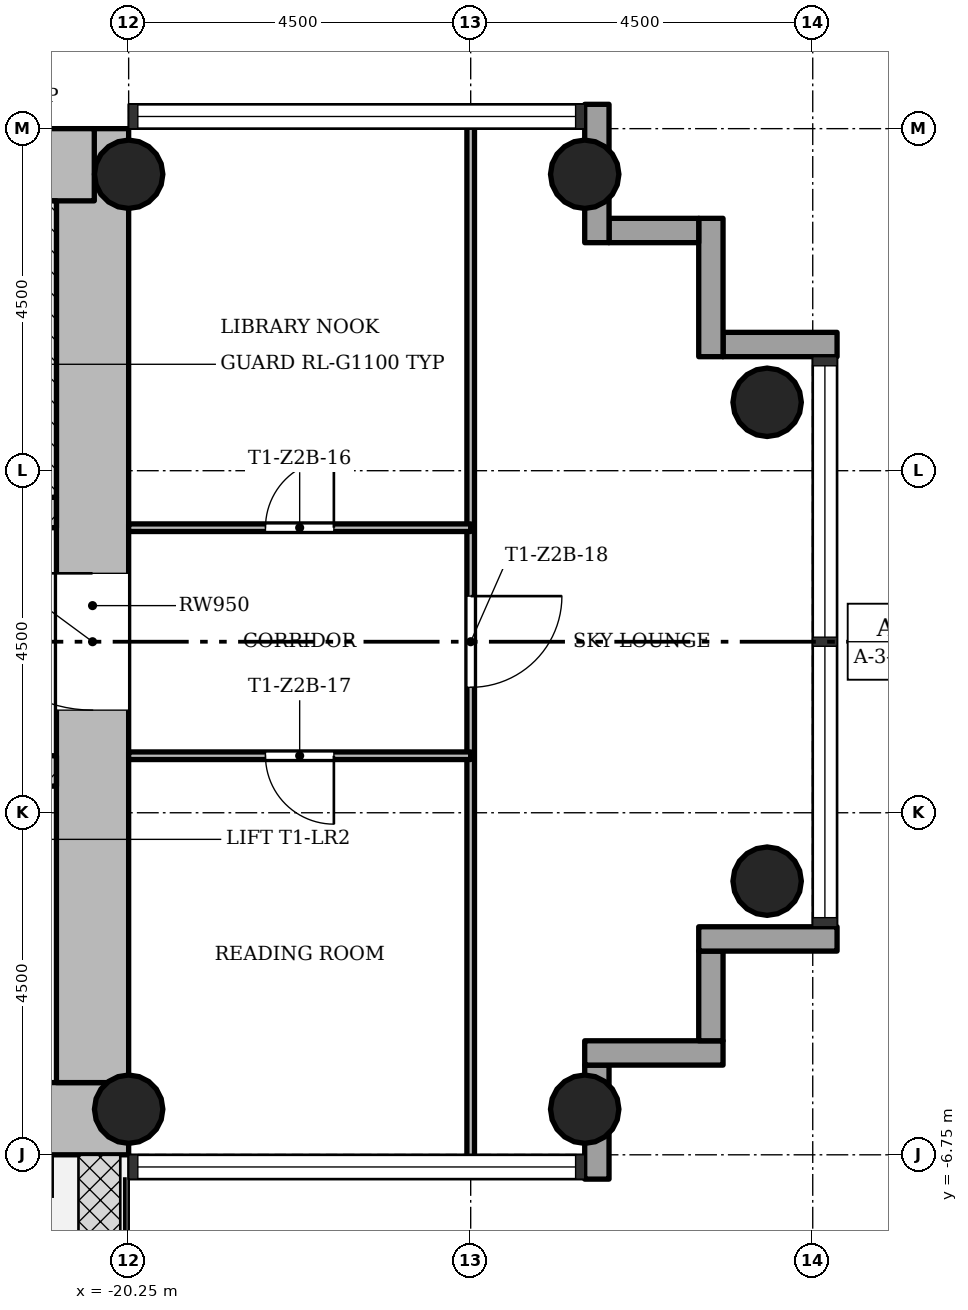
"""IFC4 building model, lengths in metres.
Left out: names, types, materials, properties, quantities, classifications, styles, units other than length and angle.
Written with IfcOpenShell. Run it as: python <this file> out.ifc"""

import sys

from ifc_helpers import new_model, si_unit, direction, frame, frame_2d, origin, origin_2d, place, context, subcontext, project, spatial, rectangle, hollow_circle, extrude, element, fill, save


model = new_model("IFC4")
c1 = context("Model", 3, precision=1e-05, world=origin(), true_north=direction((0.0, 1.0)))
c2 = subcontext(c1, "Body", "Model", "MODEL_VIEW")
j1 = project(units=[si_unit("LENGTHUNIT", "METRE"), si_unit("PLANEANGLEUNIT", "RADIAN")], contexts=[c1])
p1 = place(None, origin())
s1 = spatial("IfcSite", under=j1, at=p1, CompositionType="ELEMENT")
p2 = place(p1, origin())
s2 = spatial("IfcBuilding", under=s1, at=p2, CompositionType="ELEMENT")
p3 = place(p2, frame((0.0, 0.0, 76.6)))
s3 = spatial("IfcBuildingStorey", under=s2, at=p3, CompositionType="ELEMENT", Elevation=76.6)
p4 = place(p3, frame((-28.3, -6.275, 0.0), z_axis=(0.0, 0.0, 1.0), x_axis=(1.0, 0.0, 0.0)))
e1 = element("IfcWall", 1, at=p4, inside=s3, PredefinedType="SHEAR", context=c2, shape_type="SweptSolid", body=[
    extrude(rectangle(XDim=8.05, YDim=0.95, at=frame_2d((4.025, 0.0))), origin(), (0.0, 0.0, 1.0), 3.4),
])
p5 = place(p3, frame((-20.725, -5.8, 0.0), z_axis=(0.0, 0.0, 1.0), x_axis=(0.0, 1.0, 0.0)))
e2 = element("IfcWall", 2, at=p5, inside=s3, PredefinedType="SHEAR", context=c2, shape_type="SweptSolid", body=[
    extrude(rectangle(XDim=12.55, YDim=0.95, at=frame_2d((6.275, 0.0))), origin(), (0.0, 0.0, 1.0), 3.4),
])
p6 = place(p5, frame((4.9, 0.0, 0.0)))
e3 = element("IfcOpeningElement", 3, at=p6, cuts=e2, PredefinedType="OPENING", context=c2, shape_type="SweptSolid", body=[
    extrude(rectangle(XDim=1.8, YDim=2.1, at=frame_2d((0.9, 1.05))), frame((0.0, 0.485, 0.0), z_axis=(0.0, -1.0, 0.0), x_axis=(1.0, 0.0, 0.0)), (0.0, 0.0, 1.0), 0.97),
])
p7 = place(p3, frame((-20.702, 6.275, 0.0), z_axis=(0.0, 0.0, 1.0), x_axis=(-1.0, 0.0, 0.0)))
e4 = element("IfcWall", 4, at=p7, inside=s3, PredefinedType="SHEAR", context=c2, shape_type="SweptSolid", body=[
    extrude(rectangle(XDim=8.696, YDim=0.95, at=frame_2d((4.348, 0.0))), origin(), (0.0, 0.0, 1.0), 3.4),
])
p8 = place(p3, frame((-28.3, -1.7, 0.0), z_axis=(0.0, 0.0, 1.0), x_axis=(1.0, 0.0, 0.0)))
e5 = element("IfcWall", 5, at=p8, inside=s3, PredefinedType="SHEAR", context=c2, shape_type="SweptSolid", body=[
    extrude(rectangle(XDim=7.1, YDim=0.4, at=frame_2d((3.55, 0.0))), origin(), (0.0, 0.0, 1.0), 3.4),
])
p9 = place(p8, frame((0.8, 0.0, 0.0)))
e6 = element("IfcOpeningElement", 6, at=p9, cuts=e5, PredefinedType="OPENING", context=c2, shape_type="SweptSolid", body=[
    extrude(rectangle(XDim=1.1, YDim=2.1, at=frame_2d((0.55, 1.05))), frame((0.0, 0.21, 0.0), z_axis=(0.0, -1.0, 0.0), x_axis=(1.0, 0.0, 0.0)), (0.0, 0.0, 1.0), 0.42),
])
p10 = place(p8, frame((3.0, 0.0, 0.0)))
e7 = element("IfcOpeningElement", 7, at=p10, cuts=e5, PredefinedType="OPENING", context=c2, shape_type="SweptSolid", body=[
    extrude(rectangle(XDim=1.1, YDim=2.1, at=frame_2d((0.55, 1.05))), frame((0.0, 0.21, 0.0), z_axis=(0.0, -1.0, 0.0), x_axis=(1.0, 0.0, 0.0)), (0.0, 0.0, 1.0), 0.42),
])
p11 = place(p8, frame((5.2, 0.0, 0.0)))
e8 = element("IfcOpeningElement", 8, at=p11, cuts=e5, PredefinedType="OPENING", context=c2, shape_type="SweptSolid", body=[
    extrude(rectangle(XDim=1.1, YDim=2.1, at=frame_2d((0.55, 1.05))), frame((0.0, 0.21, 0.0), z_axis=(0.0, -1.0, 0.0), x_axis=(1.0, 0.0, 0.0)), (0.0, 0.0, 1.0), 0.42),
])
p12 = place(p3, frame((-28.3, 1.7, 0.0), z_axis=(0.0, 0.0, 1.0), x_axis=(1.0, 0.0, 0.0)))
e9 = element("IfcWall", 9, at=p12, inside=s3, PredefinedType="SHEAR", context=c2, shape_type="SweptSolid", body=[
    extrude(rectangle(XDim=7.1, YDim=0.4, at=frame_2d((3.55, 0.0))), origin(), (0.0, 0.0, 1.0), 3.4),
])
p13 = place(p12, frame((0.7, 0.0, 0.0)))
e10 = element("IfcOpeningElement", 10, at=p13, cuts=e9, PredefinedType="OPENING", context=c2, shape_type="SweptSolid", body=[
    extrude(rectangle(XDim=0.9, YDim=2.1, at=frame_2d((0.45, 1.05))), frame((0.0, 0.21, 0.0), z_axis=(0.0, -1.0, 0.0), x_axis=(1.0, 0.0, 0.0)), (0.0, 0.0, 1.0), 0.42),
])
for number, where, z_axis, x_axis in (
    (11, (-20.25, -6.15, 0.0), (0.0, 0.0, 1.0), (1.0, 0.0, 0.0)),
    (12, (-20.25, 6.15, 0.0), (0.0, 0.0, 1.0), (1.0, 0.0, 0.0)),
    (13, (-14.25, -6.15, 0.0), (0.0, 0.0, 1.0), (1.0, 0.0, 0.0)),
    (14, (-14.25, 6.15, 0.0), (0.0, 0.0, 1.0), (1.0, 0.0, 0.0)),
    (15, (-11.85, -3.15, 0.0), (0.0, 0.0, 1.0), (1.0, 0.0, 0.0)),
    (16, (-11.85, 3.15, 0.0), (0.0, 0.0, 1.0), (1.0, 0.0, 0.0)),
):
    element("IfcColumn", number, at=place(p3, frame(where, z_axis=z_axis, x_axis=x_axis)), inside=s3, PredefinedType="COLUMN", context=c2, shape_type="SweptSolid", body=[
        extrude(hollow_circle(Radius=0.45, WallThickness=0.032, at=origin_2d()), origin(), (0.0, 0.0, 1.0), 3.4),
    ])
p14 = place(p3, frame((-14.09, -7.07, -0.3), z_axis=(0.0, 0.0, 1.0), x_axis=(0.0, 1.0, 0.0)))
e17 = element("IfcWall", 17, at=p14, inside=s3, PredefinedType="STANDARD", context=c2, shape_type="SweptSolid", body=[
    extrude(rectangle(XDim=1.5, YDim=0.32, at=frame_2d((0.75, 0.0))), origin(), (0.0, 0.0, 1.0), 3.4),
])
p15 = place(p3, frame((-14.25, -5.41, -0.3), z_axis=(0.0, 0.0, 1.0), x_axis=(1.0, 0.0, 0.0)))
e18 = element("IfcWall", 18, at=p15, inside=s3, PredefinedType="STANDARD", context=c2, shape_type="SweptSolid", body=[
    extrude(rectangle(XDim=1.82, YDim=0.32, at=frame_2d((0.91, 0.0))), origin(), (0.0, 0.0, 1.0), 3.4),
])
p16 = place(p3, frame((-12.59, -5.25, -0.3), z_axis=(0.0, 0.0, 1.0), x_axis=(0.0, 1.0, 0.0)))
e19 = element("IfcWall", 19, at=p16, inside=s3, PredefinedType="STANDARD", context=c2, shape_type="SweptSolid", body=[
    extrude(rectangle(XDim=1.18, YDim=0.32, at=frame_2d((0.59, 0.0))), origin(), (0.0, 0.0, 1.0), 3.4),
])
p17 = place(p3, frame((-12.75, -3.91, -0.3), z_axis=(0.0, 0.0, 1.0), x_axis=(1.0, 0.0, 0.0)))
e20 = element("IfcWall", 20, at=p17, inside=s3, PredefinedType="STANDARD", context=c2, shape_type="SweptSolid", body=[
    extrude(rectangle(XDim=1.82, YDim=0.32, at=frame_2d((0.91, 0.0))), origin(), (0.0, 0.0, 1.0), 3.4),
])
p18 = place(p3, frame((-10.93, 3.91, -0.3), z_axis=(0.0, 0.0, 1.0), x_axis=(-1.0, 0.0, 0.0)))
e21 = element("IfcWall", 21, at=p18, inside=s3, PredefinedType="STANDARD", context=c2, shape_type="SweptSolid", body=[
    extrude(rectangle(XDim=1.5, YDim=0.32, at=frame_2d((0.75, 0.0))), origin(), (0.0, 0.0, 1.0), 3.4),
])
p19 = place(p3, frame((-12.59, 3.75, -0.3), z_axis=(0.0, 0.0, 1.0), x_axis=(0.0, 1.0, 0.0)))
e22 = element("IfcWall", 22, at=p19, inside=s3, PredefinedType="STANDARD", context=c2, shape_type="SweptSolid", body=[
    extrude(rectangle(XDim=1.82, YDim=0.32, at=frame_2d((0.91, 0.0))), origin(), (0.0, 0.0, 1.0), 3.4),
])
p20 = place(p3, frame((-12.75, 5.41, -0.3), z_axis=(0.0, 0.0, 1.0), x_axis=(-1.0, 0.0, 0.0)))
e23 = element("IfcWall", 23, at=p20, inside=s3, PredefinedType="STANDARD", context=c2, shape_type="SweptSolid", body=[
    extrude(rectangle(XDim=1.18, YDim=0.32, at=frame_2d((0.59, 0.0))), origin(), (0.0, 0.0, 1.0), 3.4),
])
p21 = place(p3, frame((-14.09, 5.25, -0.3), z_axis=(0.0, 0.0, 1.0), x_axis=(0.0, 1.0, 0.0)))
e24 = element("IfcWall", 24, at=p21, inside=s3, PredefinedType="STANDARD", context=c2, shape_type="SweptSolid", body=[
    extrude(rectangle(XDim=1.82, YDim=0.32, at=frame_2d((0.91, 0.0))), origin(), (0.0, 0.0, 1.0), 3.4),
])
p22 = place(p3, frame((-15.75, -6.85, 0.0), z_axis=(0.0, 0.0, 1.0), x_axis=(0.0, 1.0, 0.0)))
e25 = element("IfcWall", 25, at=p22, inside=s3, PredefinedType="PARTITIONING", context=c2, shape_type="SweptSolid", body=[
    extrude(rectangle(XDim=13.7, YDim=0.1, at=frame_2d((6.85, 0.0))), origin(), (0.0, 0.0, 1.0), 3.0),
])
p23 = place(p22, frame((6.25, 0.0, 0.0)))
e26 = element("IfcOpeningElement", 26, at=p23, cuts=e25, PredefinedType="OPENING", context=c2, shape_type="SweptSolid", body=[
    extrude(rectangle(XDim=1.2, YDim=2.1, at=frame_2d((0.6, 1.05))), frame((0.0, 0.06, 0.0), z_axis=(0.0, -1.0, 0.0), x_axis=(1.0, 0.0, 0.0)), (0.0, 0.0, 1.0), 0.12),
])
p24 = place(p3, frame((-20.25, -1.5, 0.0), z_axis=(0.0, 0.0, 1.0), x_axis=(1.0, 0.0, 0.0)))
e27 = element("IfcWall", 27, at=p24, inside=s3, PredefinedType="PARTITIONING", context=c2, shape_type="SweptSolid", body=[
    extrude(rectangle(XDim=4.5, YDim=0.1, at=frame_2d((2.25, 0.0))), origin(), (0.0, 0.0, 1.0), 3.0),
])
p25 = place(p24, frame((1.8, 0.0, 0.0)))
e28 = element("IfcOpeningElement", 28, at=p25, cuts=e27, PredefinedType="OPENING", context=c2, shape_type="SweptSolid", body=[
    extrude(rectangle(XDim=0.9, YDim=2.1, at=frame_2d((0.45, 1.05))), frame((0.0, 0.06, 0.0), z_axis=(0.0, -1.0, 0.0), x_axis=(1.0, 0.0, 0.0)), (0.0, 0.0, 1.0), 0.12),
])
p26 = place(p3, frame((-20.25, 1.5, 0.0), z_axis=(0.0, 0.0, 1.0), x_axis=(1.0, 0.0, 0.0)))
e29 = element("IfcWall", 29, at=p26, inside=s3, PredefinedType="PARTITIONING", context=c2, shape_type="SweptSolid", body=[
    extrude(rectangle(XDim=4.5, YDim=0.1, at=frame_2d((2.25, 0.0))), origin(), (0.0, 0.0, 1.0), 3.0),
])
p27 = place(p26, frame((1.8, 0.0, 0.0)))
e30 = element("IfcOpeningElement", 30, at=p27, cuts=e29, PredefinedType="OPENING", context=c2, shape_type="SweptSolid", body=[
    extrude(rectangle(XDim=0.9, YDim=2.1, at=frame_2d((0.45, 1.05))), frame((0.0, 0.06, 0.0), z_axis=(0.0, -1.0, 0.0), x_axis=(1.0, 0.0, 0.0)), (0.0, 0.0, 1.0), 0.12),
])
p28 = place(p3, frame((-21.325, 1.9, 0.0), z_axis=(0.0, 0.0, 1.0), x_axis=(0.0, 1.0, 0.0)))
e31 = element("IfcWall", 31, at=p28, inside=s3, PredefinedType="SHEAR", context=c2, shape_type="SweptSolid", body=[
    extrude(rectangle(XDim=3.9, YDim=0.25, at=frame_2d((1.95, 0.0))), origin(), (0.0, 0.0, 1.0), 3.4),
])
p29 = place(p27, origin())
e32 = element("IfcDoor", 32, at=p29, inside=s3, OperationType="SINGLE_SWING_LEFT", PredefinedType="DOOR", context=c2, shape_type="SweptSolid", body=[
    extrude(rectangle(XDim=0.9, YDim=2.1, at=frame_2d((0.45, 1.05))), frame((0.0, 0.025, 0.0), z_axis=(0.0, -1.0, 0.0), x_axis=(1.0, 0.0, 0.0)), (0.0, 0.0, 1.0), 0.05),
])
fill(e30, e32)
p30 = place(p25, origin())
e33 = element("IfcDoor", 33, at=p30, inside=s3, OperationType="SINGLE_SWING_RIGHT", PredefinedType="DOOR", context=c2, shape_type="SweptSolid", body=[
    extrude(rectangle(XDim=0.9, YDim=2.1, at=frame_2d((0.45, 1.05))), frame((0.0, 0.025, 0.0), z_axis=(0.0, -1.0, 0.0), x_axis=(1.0, 0.0, 0.0)), (0.0, 0.0, 1.0), 0.05),
])
fill(e28, e33)
p31 = place(p23, origin())
e34 = element("IfcDoor", 34, at=p31, inside=s3, OperationType="SINGLE_SWING_RIGHT", PredefinedType="DOOR", context=c2, shape_type="SweptSolid", body=[
    extrude(rectangle(XDim=1.2, YDim=2.1, at=frame_2d((0.6, 1.05))), frame((0.0, 0.025, 0.0), z_axis=(0.0, -1.0, 0.0), x_axis=(1.0, 0.0, 0.0)), (0.0, 0.0, 1.0), 0.05),
])
fill(e26, e34)
p32 = place(p6, origin())
e35 = element("IfcDoor", 35, at=p32, inside=s3, OperationType="SINGLE_SWING_LEFT", PredefinedType="DOOR", context=c2, shape_type="SweptSolid", body=[
    extrude(rectangle(XDim=1.8, YDim=2.1, at=frame_2d((0.9, 1.05))), frame((0.0, 0.025, 0.0), z_axis=(0.0, -1.0, 0.0), x_axis=(1.0, 0.0, 0.0)), (0.0, 0.0, 1.0), 0.05),
])
fill(e3, e35)
save(model, sys.argv[1])
